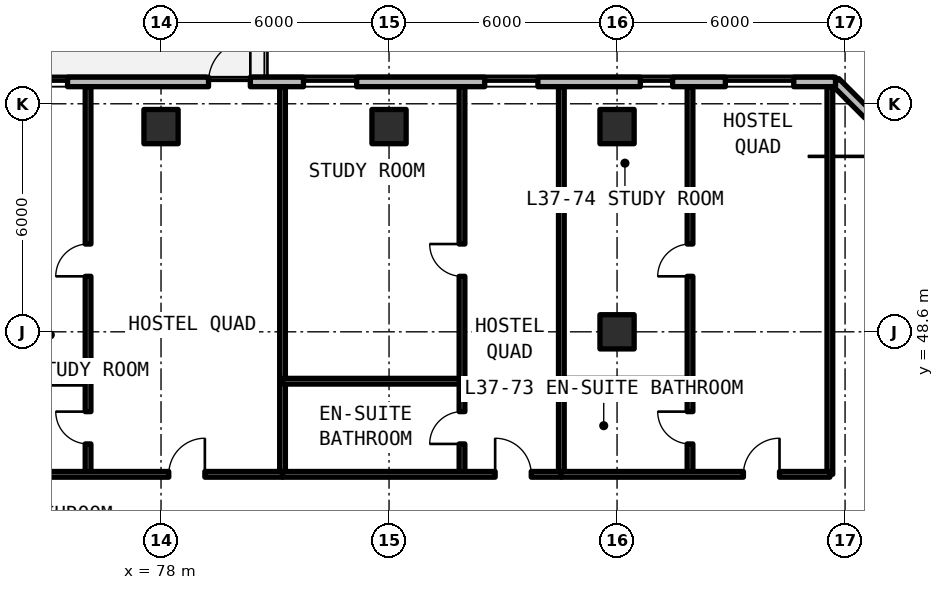
"""IFC4 building model, lengths in metres.
Left out: names, types, materials, properties, quantities, classifications, styles, units other than length and angle.
Written with IfcOpenShell. Run it as: python <this file> out.ifc"""

import sys

from ifc_helpers import new_model, si_unit, direction, frame, frame_2d, origin, origin_2d, place, context, subcontext, project, spatial, rectangle, extrude, element, fill, save


model = new_model("IFC4")
c1 = context("Model", 3, precision=1e-05, world=origin(), true_north=direction((0.0, 1.0)))
c2 = subcontext(c1, "Body", "Model", "MODEL_VIEW")
j1 = project(units=[si_unit("LENGTHUNIT", "METRE"), si_unit("PLANEANGLEUNIT", "RADIAN")], contexts=[c1])
p1 = place(None, origin())
s1 = spatial("IfcSite", under=j1, at=p1, CompositionType="ELEMENT")
p2 = place(p1, origin())
s2 = spatial("IfcBuilding", under=s1, at=p2, CompositionType="ELEMENT")
p3 = place(p2, frame((0.0, 0.0, 135.3)))
s3 = spatial("IfcBuildingStorey", under=s2, at=p3, CompositionType="ELEMENT", Elevation=135.3)
for number, where, z_axis, x_axis in (
    (1, (90.0, 48.6, 0.0), (0.0, 0.0, 1.0), (1.0, 0.0, 0.0)),
    (2, (78.0, 54.0, 0.0), (0.0, 0.0, 1.0), (1.0, 0.0, 0.0)),
    (3, (84.0, 54.0, 0.0), (0.0, 0.0, 1.0), (1.0, 0.0, 0.0)),
    (4, (90.0, 54.0, 0.0), (0.0, 0.0, 1.0), (1.0, 0.0, 0.0)),
):
    element("IfcColumn", number, at=place(p3, frame(where, z_axis=z_axis, x_axis=x_axis)), inside=s3, PredefinedType="COLUMN", context=c2, shape_type="SweptSolid", body=[
        extrude(rectangle(XDim=0.9, YDim=0.9, at=origin_2d()), origin(), (0.0, 0.0, 1.0), 3.3),
    ])
p4 = place(p3, frame((99.875, 51.048, 0.0), z_axis=(0.0, 0.0, 1.0), x_axis=(-0.70708586489, 0.707127696864, 0.0)))
e5 = element("IfcWall", 5, at=p4, inside=s3, PredefinedType="SOLIDWALL", context=c2, shape_type="SweptSolid", body=[
    extrude(rectangle(XDim=5.836, YDim=0.25, at=frame_2d((2.918, 0.0))), origin(), (0.0, 0.0, 1.0), 3.08),
])
p5 = place(p4, frame((1.218, 0.0, 0.78)))
e6 = element("IfcOpeningElement", 6, at=p5, cuts=e5, PredefinedType="OPENING", context=c2, shape_type="SweptSolid", body=[
    extrude(rectangle(XDim=3.4, YDim=1.66, at=frame_2d((1.7, 0.83))), frame((0.0, 0.135, 0.0), z_axis=(0.0, -1.0, 0.0), x_axis=(1.0, 0.0, 0.0)), (0.0, 0.0, 1.0), 0.27),
])
p6 = place(p3, frame((95.748, 55.175, 0.0), z_axis=(0.0, 0.0, 1.0), x_axis=(-1.0, 0.0, 0.0)))
e7 = element("IfcWall", 7, at=p6, inside=s3, PredefinedType="SOLIDWALL", context=c2, shape_type="SweptSolid", body=[
    extrude(rectangle(XDim=43.623, YDim=0.25, at=frame_2d((21.812, 0.0))), origin(), (0.0, 0.0, 1.0), 3.08),
])
p7 = place(p6, frame((31.598, 0.0, 0.0)))
e8 = element("IfcOpeningElement", 8, at=p7, cuts=e7, PredefinedType="OPENING", context=c2, shape_type="SweptSolid", body=[
    extrude(rectangle(XDim=1.1, YDim=2.15, at=frame_2d((0.55, 1.075))), frame((0.0, 0.135, 0.0), z_axis=(0.0, -1.0, 0.0), x_axis=(1.0, 0.0, 0.0)), (0.0, 0.0, 1.0), 0.27),
])
p8 = place(p6, frame((15.398, 0.0, 0.0)))
e9 = element("IfcOpeningElement", 9, at=p8, cuts=e7, PredefinedType="OPENING", context=c2, shape_type="SweptSolid", body=[
    extrude(rectangle(XDim=1.1, YDim=2.15, at=frame_2d((0.55, 1.075))), frame((0.0, 0.135, 0.0), z_axis=(0.0, -1.0, 0.0), x_axis=(1.0, 0.0, 0.0)), (0.0, 0.0, 1.0), 0.27),
])
p9 = place(p6, frame((40.333, 0.0, 0.78)))
e10 = element("IfcOpeningElement", 10, at=p9, cuts=e7, PredefinedType="OPENING", context=c2, shape_type="SweptSolid", body=[
    extrude(rectangle(XDim=0.85, YDim=1.65, at=frame_2d((0.425, 0.825))), frame((0.0, 0.135, 0.0), z_axis=(0.0, -1.0, 0.0), x_axis=(1.0, 0.0, 0.0)), (0.0, 0.0, 1.0), 0.27),
])
p10 = place(p6, frame((37.17, 0.0, 0.78)))
e11 = element("IfcOpeningElement", 11, at=p10, cuts=e7, PredefinedType="OPENING", context=c2, shape_type="SweptSolid", body=[
    extrude(rectangle(XDim=1.8, YDim=1.66, at=frame_2d((0.9, 0.83))), frame((0.0, 0.135, 0.0), z_axis=(0.0, -1.0, 0.0), x_axis=(1.0, 0.0, 0.0)), (0.0, 0.0, 1.0), 0.27),
])
p11 = place(p6, frame((27.615, 0.0, 0.78)))
e12 = element("IfcOpeningElement", 12, at=p11, cuts=e7, PredefinedType="OPENING", context=c2, shape_type="SweptSolid", body=[
    extrude(rectangle(XDim=0.85, YDim=1.65, at=frame_2d((0.425, 0.825))), frame((0.0, 0.135, 0.0), z_axis=(0.0, -1.0, 0.0), x_axis=(1.0, 0.0, 0.0)), (0.0, 0.0, 1.0), 0.27),
])
p12 = place(p6, frame((24.516, 0.0, 0.78)))
e13 = element("IfcOpeningElement", 13, at=p12, cuts=e7, PredefinedType="OPENING", context=c2, shape_type="SweptSolid", body=[
    extrude(rectangle(XDim=1.4, YDim=1.65, at=frame_2d((0.7, 0.825))), frame((0.0, 0.135, 0.0), z_axis=(0.0, -1.0, 0.0), x_axis=(1.0, 0.0, 0.0)), (0.0, 0.0, 1.0), 0.27),
])
p13 = place(p6, frame((20.208, 0.0, 0.78)))
e14 = element("IfcOpeningElement", 14, at=p13, cuts=e7, PredefinedType="OPENING", context=c2, shape_type="SweptSolid", body=[
    extrude(rectangle(XDim=0.85, YDim=1.65, at=frame_2d((0.425, 0.825))), frame((0.0, 0.135, 0.0), z_axis=(0.0, -1.0, 0.0), x_axis=(1.0, 0.0, 0.0)), (0.0, 0.0, 1.0), 0.27),
])
p14 = place(p6, frame((12.6, 0.0, 0.78)))
e15 = element("IfcOpeningElement", 15, at=p14, cuts=e7, PredefinedType="OPENING", context=c2, shape_type="SweptSolid", body=[
    extrude(rectangle(XDim=1.4, YDim=1.65, at=frame_2d((0.7, 0.825))), frame((0.0, 0.135, 0.0), z_axis=(0.0, -1.0, 0.0), x_axis=(1.0, 0.0, 0.0)), (0.0, 0.0, 1.0), 0.27),
])
p15 = place(p6, frame((7.831, 0.0, 0.78)))
e16 = element("IfcOpeningElement", 16, at=p15, cuts=e7, PredefinedType="OPENING", context=c2, shape_type="SweptSolid", body=[
    extrude(rectangle(XDim=1.4, YDim=1.65, at=frame_2d((0.7, 0.825))), frame((0.0, 0.135, 0.0), z_axis=(0.0, -1.0, 0.0), x_axis=(1.0, 0.0, 0.0)), (0.0, 0.0, 1.0), 0.27),
])
p16 = place(p6, frame((4.286, 0.0, 0.78)))
e17 = element("IfcOpeningElement", 17, at=p16, cuts=e7, PredefinedType="OPENING", context=c2, shape_type="SweptSolid", body=[
    extrude(rectangle(XDim=0.85, YDim=1.65, at=frame_2d((0.425, 0.825))), frame((0.0, 0.135, 0.0), z_axis=(0.0, -1.0, 0.0), x_axis=(1.0, 0.0, 0.0)), (0.0, 0.0, 1.0), 0.27),
])
p17 = place(p6, frame((1.098, 0.0, 0.78)))
e18 = element("IfcOpeningElement", 18, at=p17, cuts=e7, PredefinedType="OPENING", context=c2, shape_type="SweptSolid", body=[
    extrude(rectangle(XDim=1.8, YDim=1.66, at=frame_2d((0.9, 0.83))), frame((0.0, 0.135, 0.0), z_axis=(0.0, -1.0, 0.0), x_axis=(1.0, 0.0, 0.0)), (0.0, 0.0, 1.0), 0.27),
])
for number, where, z_axis, x_axis in (
    (19, (95.6, 44.85, 0.0), (0.0, 0.0, 1.0), (0.0, 1.0, 0.0)),
    (20, (81.197, 44.85, 0.0), (0.0, 0.0, 1.0), (0.0, 1.0, 0.0)),
):
    element("IfcWall", number, at=place(p3, frame(where, z_axis=z_axis, x_axis=x_axis)), inside=s3, PredefinedType="SOLIDWALL", context=c2, shape_type="SweptSolid", body=[
        extrude(rectangle(XDim=10.2, YDim=0.15, at=frame_2d((5.1, 0.0))), origin(), (0.0, 0.0, 1.0), 2.35),
    ])
p18 = place(p3, frame((74.132, 47.3, 0.0), z_axis=(0.0, 0.0, 1.0), x_axis=(1.0, 0.0, 0.0)))
e21 = element("IfcWall", 21, at=p18, inside=s3, PredefinedType="PARTITIONING", context=c2, shape_type="SweptSolid", body=[
    extrude(rectangle(XDim=1.948, YDim=0.15, at=frame_2d((0.974, 0.0))), origin(), (0.0, 0.0, 1.0), 2.35),
])
p19 = place(p3, frame((76.08, 44.85, 0.0), z_axis=(0.0, 0.0, 1.0), x_axis=(0.0, 1.0, 0.0)))
e22 = element("IfcWall", 22, at=p19, inside=s3, PredefinedType="PARTITIONING", context=c2, shape_type="SweptSolid", body=[
    extrude(rectangle(XDim=10.2, YDim=0.15, at=frame_2d((5.1, 0.0))), origin(), (0.0, 0.0, 1.0), 2.35),
])
p20 = place(p19, frame((0.8, 0.0, 0.0)))
e23 = element("IfcOpeningElement", 23, at=p20, cuts=e22, PredefinedType="OPENING", context=c2, shape_type="SweptSolid", body=[
    extrude(rectangle(XDim=0.85, YDim=2.1, at=frame_2d((0.425, 1.05))), frame((0.0, 0.085, 0.0), z_axis=(0.0, -1.0, 0.0), x_axis=(1.0, 0.0, 0.0)), (0.0, 0.0, 1.0), 0.17),
])
p21 = place(p19, frame((5.21, 0.0, 0.0)))
e24 = element("IfcOpeningElement", 24, at=p21, cuts=e22, PredefinedType="OPENING", context=c2, shape_type="SweptSolid", body=[
    extrude(rectangle(XDim=0.85, YDim=2.1, at=frame_2d((0.425, 1.05))), frame((0.0, 0.085, 0.0), z_axis=(0.0, -1.0, 0.0), x_axis=(1.0, 0.0, 0.0)), (0.0, 0.0, 1.0), 0.17),
])
p22 = place(p3, frame((74.132, 44.85, 0.0), z_axis=(0.0, 0.0, 1.0), x_axis=(1.0, 0.0, 0.0)))
e25 = element("IfcWall", 25, at=p22, inside=s3, PredefinedType="SOLIDWALL", context=c2, shape_type="SweptSolid", body=[
    extrude(rectangle(XDim=7.066, YDim=0.15, at=frame_2d((3.533, 0.0))), origin(), (0.0, 0.0, 1.0), 2.35),
])
p23 = place(p22, frame((4.072, 0.0, 0.0)))
e26 = element("IfcOpeningElement", 26, at=p23, cuts=e25, PredefinedType="OPENING", context=c2, shape_type="SweptSolid", body=[
    extrude(rectangle(XDim=0.95, YDim=2.15, at=frame_2d((0.475, 1.075))), frame((0.0, 0.085, 0.0), z_axis=(0.0, -1.0, 0.0), x_axis=(1.0, 0.0, 0.0)), (0.0, 0.0, 1.0), 0.17),
])
p24 = place(p3, frame((88.534, 44.85, 0.0), z_axis=(0.0, 0.0, 1.0), x_axis=(0.0, 1.0, 0.0)))
e27 = element("IfcWall", 27, at=p24, inside=s3, PredefinedType="SOLIDWALL", context=c2, shape_type="SweptSolid", body=[
    extrude(rectangle(XDim=10.2, YDim=0.15, at=frame_2d((5.1, 0.0))), origin(), (0.0, 0.0, 1.0), 2.35),
])
p25 = place(p3, frame((81.197, 47.3, 0.0), z_axis=(0.0, 0.0, 1.0), x_axis=(1.0, 0.0, 0.0)))
e28 = element("IfcWall", 28, at=p25, inside=s3, PredefinedType="PARTITIONING", context=c2, shape_type="SweptSolid", body=[
    extrude(rectangle(XDim=4.723, YDim=0.15, at=frame_2d((2.361, 0.0))), origin(), (0.0, 0.0, 1.0), 2.35),
])
p26 = place(p3, frame((85.92, 44.85, 0.0), z_axis=(0.0, 0.0, 1.0), x_axis=(0.0, 1.0, 0.0)))
e29 = element("IfcWall", 29, at=p26, inside=s3, PredefinedType="PARTITIONING", context=c2, shape_type="SweptSolid", body=[
    extrude(rectangle(XDim=10.2, YDim=0.15, at=frame_2d((5.1, 0.0))), origin(), (0.0, 0.0, 1.0), 2.35),
])
p27 = place(p26, frame((0.8, 0.0, 0.0)))
e30 = element("IfcOpeningElement", 30, at=p27, cuts=e29, PredefinedType="OPENING", context=c2, shape_type="SweptSolid", body=[
    extrude(rectangle(XDim=0.85, YDim=2.1, at=frame_2d((0.425, 1.05))), frame((0.0, 0.085, 0.0), z_axis=(0.0, -1.0, 0.0), x_axis=(1.0, 0.0, 0.0)), (0.0, 0.0, 1.0), 0.17),
])
p28 = place(p26, frame((5.21, 0.0, 0.0)))
e31 = element("IfcOpeningElement", 31, at=p28, cuts=e29, PredefinedType="OPENING", context=c2, shape_type="SweptSolid", body=[
    extrude(rectangle(XDim=0.85, YDim=2.1, at=frame_2d((0.425, 1.05))), frame((0.0, 0.085, 0.0), z_axis=(0.0, -1.0, 0.0), x_axis=(1.0, 0.0, 0.0)), (0.0, 0.0, 1.0), 0.17),
])
p29 = place(p3, frame((81.197, 44.85, 0.0), z_axis=(0.0, 0.0, 1.0), x_axis=(1.0, 0.0, 0.0)))
e32 = element("IfcWall", 32, at=p29, inside=s3, PredefinedType="SOLIDWALL", context=c2, shape_type="SweptSolid", body=[
    extrude(rectangle(XDim=7.337, YDim=0.15, at=frame_2d((3.668, 0.0))), origin(), (0.0, 0.0, 1.0), 2.35),
])
p30 = place(p29, frame((5.595, 0.0, 0.0)))
e33 = element("IfcOpeningElement", 33, at=p30, cuts=e32, PredefinedType="OPENING", context=c2, shape_type="SweptSolid", body=[
    extrude(rectangle(XDim=0.95, YDim=2.15, at=frame_2d((0.475, 1.075))), frame((0.0, 0.085, 0.0), z_axis=(0.0, -1.0, 0.0), x_axis=(1.0, 0.0, 0.0)), (0.0, 0.0, 1.0), 0.17),
])
p31 = place(p3, frame((88.534, 47.3, 0.0), z_axis=(0.0, 0.0, 1.0), x_axis=(1.0, 0.0, 0.0)))
e34 = element("IfcWall", 34, at=p31, inside=s3, PredefinedType="PARTITIONING", context=c2, shape_type="SweptSolid", body=[
    extrude(rectangle(XDim=3.385, YDim=0.15, at=frame_2d((1.693, 0.0))), origin(), (0.0, 0.0, 1.0), 2.35),
])
p32 = place(p3, frame((91.92, 44.85, 0.0), z_axis=(0.0, 0.0, 1.0), x_axis=(0.0, 1.0, 0.0)))
e35 = element("IfcWall", 35, at=p32, inside=s3, PredefinedType="PARTITIONING", context=c2, shape_type="SweptSolid", body=[
    extrude(rectangle(XDim=10.2, YDim=0.15, at=frame_2d((5.1, 0.0))), origin(), (0.0, 0.0, 1.0), 2.35),
])
p33 = place(p32, frame((0.8, 0.0, 0.0)))
e36 = element("IfcOpeningElement", 36, at=p33, cuts=e35, PredefinedType="OPENING", context=c2, shape_type="SweptSolid", body=[
    extrude(rectangle(XDim=0.85, YDim=2.1, at=frame_2d((0.425, 1.05))), frame((0.0, 0.085, 0.0), z_axis=(0.0, -1.0, 0.0), x_axis=(1.0, 0.0, 0.0)), (0.0, 0.0, 1.0), 0.17),
])
p34 = place(p32, frame((5.21, 0.0, 0.0)))
e37 = element("IfcOpeningElement", 37, at=p34, cuts=e35, PredefinedType="OPENING", context=c2, shape_type="SweptSolid", body=[
    extrude(rectangle(XDim=0.85, YDim=2.1, at=frame_2d((0.425, 1.05))), frame((0.0, 0.085, 0.0), z_axis=(0.0, -1.0, 0.0), x_axis=(1.0, 0.0, 0.0)), (0.0, 0.0, 1.0), 0.17),
])
p35 = place(p3, frame((88.534, 44.85, 0.0), z_axis=(0.0, 0.0, 1.0), x_axis=(1.0, 0.0, 0.0)))
e38 = element("IfcWall", 38, at=p35, inside=s3, PredefinedType="SOLIDWALL", context=c2, shape_type="SweptSolid", body=[
    extrude(rectangle(XDim=7.066, YDim=0.15, at=frame_2d((3.533, 0.0))), origin(), (0.0, 0.0, 1.0), 2.35),
])
p36 = place(p35, frame((4.791, 0.0, 0.0)))
e39 = element("IfcOpeningElement", 39, at=p36, cuts=e38, PredefinedType="OPENING", context=c2, shape_type="SweptSolid", body=[
    extrude(rectangle(XDim=0.95, YDim=2.15, at=frame_2d((0.475, 1.075))), frame((0.0, 0.085, 0.0), z_axis=(0.0, -1.0, 0.0), x_axis=(1.0, 0.0, 0.0)), (0.0, 0.0, 1.0), 0.17),
])
p37 = place(p8, frame((1.1, 0.0, 0.0), z_axis=(0.0, 0.0, 1.0), x_axis=(-1.0, 0.0, 0.0)))
e40 = element("IfcDoor", 40, at=p37, inside=s3, OperationType="SINGLE_SWING_LEFT", PredefinedType="DOOR", context=c2, shape_type="SweptSolid", body=[
    extrude(rectangle(XDim=1.1, YDim=2.15, at=frame_2d((0.55, 1.075))), frame((0.0, 0.025, 0.0), z_axis=(0.0, -1.0, 0.0), x_axis=(1.0, 0.0, 0.0)), (0.0, 0.0, 1.0), 0.05),
])
fill(e9, e40)
p38 = place(p13, origin())
e41 = element("IfcWindow", 41, at=p38, inside=s3, PartitioningType="SINGLE_PANEL", PredefinedType="WINDOW", context=c2, shape_type="SweptSolid", body=[
    extrude(rectangle(XDim=0.85, YDim=1.65, at=frame_2d((0.425, 0.825))), frame((0.0, 0.03, 0.0), z_axis=(0.0, -1.0, 0.0), x_axis=(1.0, 0.0, 0.0)), (0.0, 0.0, 1.0), 0.06),
])
fill(e14, e41)
p39 = place(p14, origin())
e42 = element("IfcWindow", 42, at=p39, inside=s3, PartitioningType="SINGLE_PANEL", PredefinedType="WINDOW", context=c2, shape_type="SweptSolid", body=[
    extrude(rectangle(XDim=1.4, YDim=1.65, at=frame_2d((0.7, 0.825))), frame((0.0, 0.03, 0.0), z_axis=(0.0, -1.0, 0.0), x_axis=(1.0, 0.0, 0.0)), (0.0, 0.0, 1.0), 0.06),
])
fill(e15, e42)
p40 = place(p15, origin())
e43 = element("IfcWindow", 43, at=p40, inside=s3, PartitioningType="SINGLE_PANEL", PredefinedType="WINDOW", context=c2, shape_type="SweptSolid", body=[
    extrude(rectangle(XDim=1.4, YDim=1.65, at=frame_2d((0.7, 0.825))), frame((0.0, 0.03, 0.0), z_axis=(0.0, -1.0, 0.0), x_axis=(1.0, 0.0, 0.0)), (0.0, 0.0, 1.0), 0.06),
])
fill(e16, e43)
p41 = place(p16, origin())
e44 = element("IfcWindow", 44, at=p41, inside=s3, PartitioningType="SINGLE_PANEL", PredefinedType="WINDOW", context=c2, shape_type="SweptSolid", body=[
    extrude(rectangle(XDim=0.85, YDim=1.65, at=frame_2d((0.425, 0.825))), frame((0.0, 0.03, 0.0), z_axis=(0.0, -1.0, 0.0), x_axis=(1.0, 0.0, 0.0)), (0.0, 0.0, 1.0), 0.06),
])
fill(e17, e44)
p42 = place(p17, origin())
e45 = element("IfcWindow", 45, at=p42, inside=s3, PartitioningType="SINGLE_PANEL", PredefinedType="WINDOW", context=c2, shape_type="SweptSolid", body=[
    extrude(rectangle(XDim=1.8, YDim=1.66, at=frame_2d((0.9, 0.83))), frame((0.0, 0.03, 0.0), z_axis=(0.0, -1.0, 0.0), x_axis=(1.0, 0.0, 0.0)), (0.0, 0.0, 1.0), 0.06),
])
fill(e18, e45)
p43 = place(p20, origin())
e46 = element("IfcDoor", 46, at=p43, inside=s3, OperationType="SINGLE_SWING_RIGHT", PredefinedType="DOOR", context=c2, shape_type="SweptSolid", body=[
    extrude(rectangle(XDim=0.85, YDim=2.1, at=frame_2d((0.425, 1.05))), frame((0.0, 0.025, 0.0), z_axis=(0.0, -1.0, 0.0), x_axis=(1.0, 0.0, 0.0)), (0.0, 0.0, 1.0), 0.05),
])
fill(e23, e46)
p44 = place(p21, origin())
e47 = element("IfcDoor", 47, at=p44, inside=s3, OperationType="SINGLE_SWING_LEFT", PredefinedType="DOOR", context=c2, shape_type="SweptSolid", body=[
    extrude(rectangle(XDim=0.85, YDim=2.1, at=frame_2d((0.425, 1.05))), frame((0.0, 0.025, 0.0), z_axis=(0.0, -1.0, 0.0), x_axis=(1.0, 0.0, 0.0)), (0.0, 0.0, 1.0), 0.05),
])
fill(e24, e47)
p45 = place(p23, origin())
e48 = element("IfcDoor", 48, at=p45, inside=s3, OperationType="SINGLE_SWING_RIGHT", PredefinedType="DOOR", context=c2, shape_type="SweptSolid", body=[
    extrude(rectangle(XDim=0.95, YDim=2.15, at=frame_2d((0.475, 1.075))), frame((0.0, 0.025, 0.0), z_axis=(0.0, -1.0, 0.0), x_axis=(1.0, 0.0, 0.0)), (0.0, 0.0, 1.0), 0.05),
])
fill(e26, e48)
p46 = place(p27, origin())
e49 = element("IfcDoor", 49, at=p46, inside=s3, OperationType="SINGLE_SWING_LEFT", PredefinedType="DOOR", context=c2, shape_type="SweptSolid", body=[
    extrude(rectangle(XDim=0.85, YDim=2.1, at=frame_2d((0.425, 1.05))), frame((0.0, 0.025, 0.0), z_axis=(0.0, -1.0, 0.0), x_axis=(1.0, 0.0, 0.0)), (0.0, 0.0, 1.0), 0.05),
])
fill(e30, e49)
p47 = place(p28, origin())
e50 = element("IfcDoor", 50, at=p47, inside=s3, OperationType="SINGLE_SWING_RIGHT", PredefinedType="DOOR", context=c2, shape_type="SweptSolid", body=[
    extrude(rectangle(XDim=0.85, YDim=2.1, at=frame_2d((0.425, 1.05))), frame((0.0, 0.025, 0.0), z_axis=(0.0, -1.0, 0.0), x_axis=(1.0, 0.0, 0.0)), (0.0, 0.0, 1.0), 0.05),
])
fill(e31, e50)
p48 = place(p30, origin())
e51 = element("IfcDoor", 51, at=p48, inside=s3, OperationType="SINGLE_SWING_LEFT", PredefinedType="DOOR", context=c2, shape_type="SweptSolid", body=[
    extrude(rectangle(XDim=0.95, YDim=2.15, at=frame_2d((0.475, 1.075))), frame((0.0, 0.025, 0.0), z_axis=(0.0, -1.0, 0.0), x_axis=(1.0, 0.0, 0.0)), (0.0, 0.0, 1.0), 0.05),
])
fill(e33, e51)
p49 = place(p33, origin())
e52 = element("IfcDoor", 52, at=p49, inside=s3, OperationType="SINGLE_SWING_RIGHT", PredefinedType="DOOR", context=c2, shape_type="SweptSolid", body=[
    extrude(rectangle(XDim=0.85, YDim=2.1, at=frame_2d((0.425, 1.05))), frame((0.0, 0.025, 0.0), z_axis=(0.0, -1.0, 0.0), x_axis=(1.0, 0.0, 0.0)), (0.0, 0.0, 1.0), 0.05),
])
fill(e36, e52)
p50 = place(p34, origin())
e53 = element("IfcDoor", 53, at=p50, inside=s3, OperationType="SINGLE_SWING_LEFT", PredefinedType="DOOR", context=c2, shape_type="SweptSolid", body=[
    extrude(rectangle(XDim=0.85, YDim=2.1, at=frame_2d((0.425, 1.05))), frame((0.0, 0.025, 0.0), z_axis=(0.0, -1.0, 0.0), x_axis=(1.0, 0.0, 0.0)), (0.0, 0.0, 1.0), 0.05),
])
fill(e37, e53)
p51 = place(p36, origin())
e54 = element("IfcDoor", 54, at=p51, inside=s3, OperationType="SINGLE_SWING_RIGHT", PredefinedType="DOOR", context=c2, shape_type="SweptSolid", body=[
    extrude(rectangle(XDim=0.95, YDim=2.15, at=frame_2d((0.475, 1.075))), frame((0.0, 0.025, 0.0), z_axis=(0.0, -1.0, 0.0), x_axis=(1.0, 0.0, 0.0)), (0.0, 0.0, 1.0), 0.05),
])
fill(e39, e54)
save(model, sys.argv[1])
